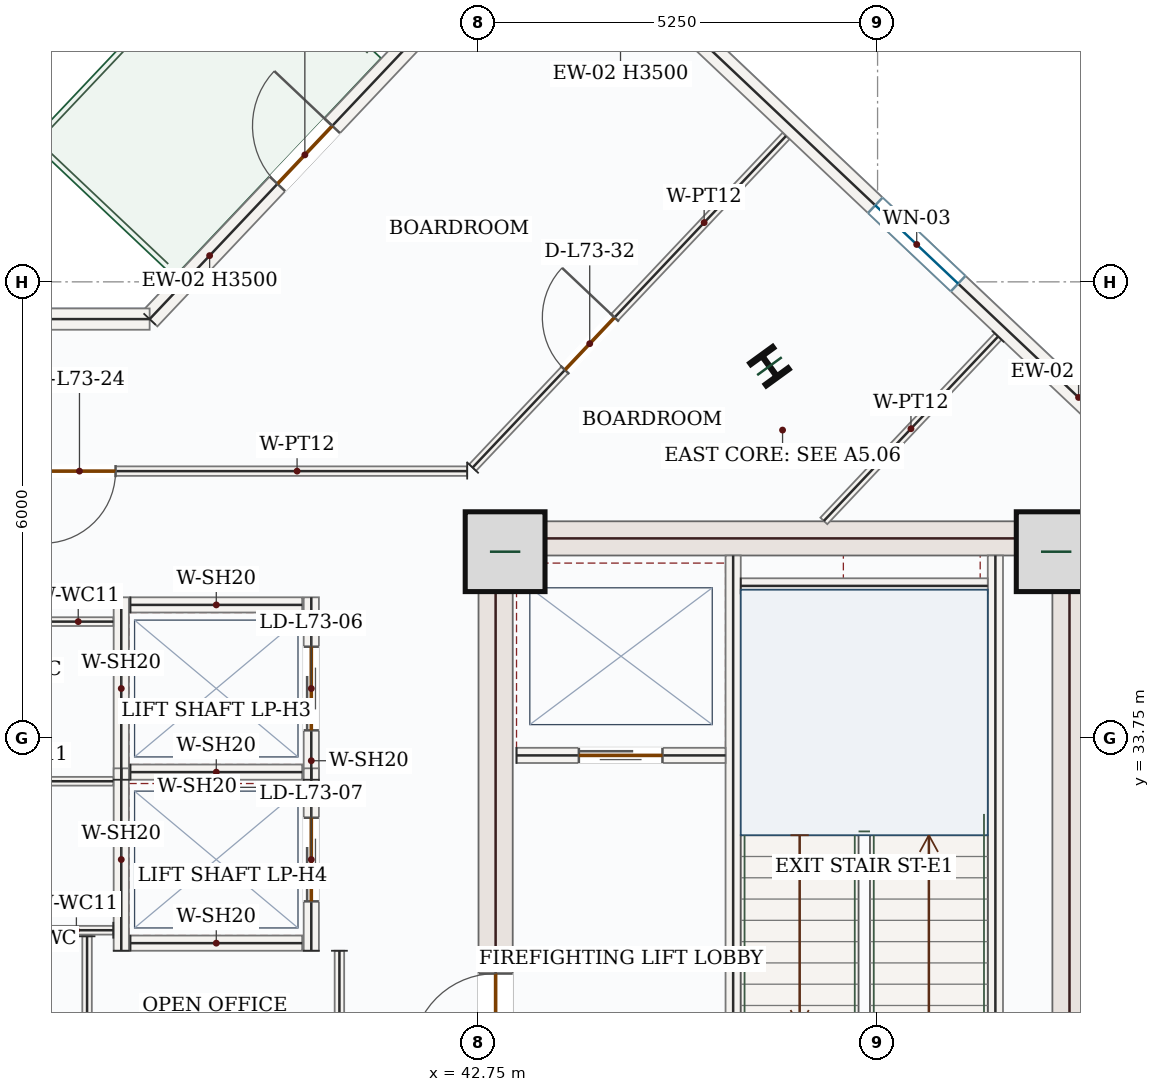
"""IFC4 building model, lengths in metres.
Left out: names, types, materials, properties, quantities, classifications, styles, units other than length and angle.
Written with IfcOpenShell. Run it as: python <this file> out.ifc"""

import sys

from ifc_helpers import new_model, si_unit, direction, frame, frame_2d, origin, origin_2d, place, context, subcontext, project, spatial, rectangle, i_section, extrude, source, transform, mapped, element, fill, save


model = new_model("IFC4")
c1 = context("Model", 3, precision=1e-05, world=origin(), true_north=direction((0.0, 1.0)))
c2 = subcontext(c1, "Body", "Model", "MODEL_VIEW")
j1 = project(units=[si_unit("LENGTHUNIT", "METRE"), si_unit("PLANEANGLEUNIT", "RADIAN")], contexts=[c1])
p1 = place(None, origin())
s1 = spatial("IfcSite", under=j1, at=p1, CompositionType="ELEMENT")
p2 = place(p1, origin())
s2 = spatial("IfcBuilding", under=s1, at=p2, CompositionType="ELEMENT")
p3 = place(p2, frame((0.0, 0.0, 302.85)))
s3 = spatial("IfcBuildingStorey", under=s2, at=p3, CompositionType="ELEMENT", Elevation=302.85)
p4 = place(p3, frame((42.975, 28.05, 0.0), z_axis=(0.0, 0.0, 1.0), x_axis=(0.0, 1.0, 0.0)))
e1 = element("IfcWall", 1, at=p4, inside=s3, PredefinedType="SHEAR", context=c2, shape_type="SweptSolid", body=[
    extrude(rectangle(XDim=8.55, YDim=0.45, at=frame_2d((4.275, 0.0))), origin(), (0.0, 0.0, 1.0), 3.5),
])
p5 = place(p4, frame((1.5, 0.0, 0.0)))
e2 = element("IfcOpeningElement", 2, at=p5, cuts=e1, PredefinedType="OPENING", context=c2, shape_type="SweptSolid", body=[
    extrude(rectangle(XDim=1.1, YDim=2.2, at=frame_2d((0.55, 1.1))), frame((0.0, 0.235, 0.0), z_axis=(0.0, -1.0, 0.0), x_axis=(1.0, 0.0, 0.0)), (0.0, 0.0, 1.0), 0.47),
])
m1 = source(origin(), c2, "Body", "SweptSolid", [
    extrude(rectangle(XDim=8.55, YDim=0.45, at=frame_2d((4.275, 0.0))), origin(), (0.0, 0.0, 1.0), 3.5),
])
p6 = place(p3, frame((50.525, 28.05, 0.0), z_axis=(0.0, 0.0, 1.0), x_axis=(0.0, 1.0, 0.0)))
e3 = element("IfcWall", 3, at=p6, inside=s3, PredefinedType="SHEAR", context=c2, shape_type="MappedRepresentation", body=[
    mapped(m1, transform((0.0, 0.0, 0.0), x_axis=(1.0, 0.0, 0.0), y_axis=(0.0, 1.0, 0.0), z_axis=(0.0, 0.0, 1.0), scale=1.0)),
])
m2 = source(origin(), c2, "Body", "SweptSolid", [
    extrude(rectangle(XDim=7.1, YDim=0.45, at=frame_2d((3.55, 0.0))), origin(), (0.0, 0.0, 1.0), 3.5),
])
p7 = place(p3, frame((43.2, 36.375, 0.0), z_axis=(0.0, 0.0, 1.0), x_axis=(1.0, 0.0, 0.0)))
e4 = element("IfcWall", 4, at=p7, inside=s3, PredefinedType="SHEAR", context=c2, shape_type="MappedRepresentation", body=[
    mapped(m2, transform((0.0, 0.0, 0.0), x_axis=(1.0, 0.0, 0.0), y_axis=(0.0, 1.0, 0.0), z_axis=(0.0, 0.0, 1.0), scale=1.0)),
])
m3 = source(origin(), c2, "Body", "SweptSolid", [
    extrude(rectangle(XDim=1.05, YDim=1.05, at=origin_2d()), origin(), (0.0, 0.0, 1.0), 3.75),
])
for number, where, z_axis, x_axis in (
    (5, (43.1, 36.2, 0.0), (0.0, 0.0, 1.0), (1.0, 0.0, 0.0)),
    (6, (50.35, 36.2, 0.0), (0.0, 0.0, 1.0), (1.0, 0.0, 0.0)),
):
    element("IfcColumn", number, at=place(p3, frame(where, z_axis=z_axis, x_axis=x_axis)), inside=s3, PredefinedType="COLUMN", context=c2, shape_type="MappedRepresentation", body=[
        mapped(m3, transform((0.0, 0.0, 0.0), x_axis=(1.0, 0.0, 0.0), y_axis=(0.0, 1.0, 0.0), z_axis=(0.0, 0.0, 1.0), scale=1.0)),
    ])
m4 = source(origin(), c2, "Body", "SweptSolid", [
    extrude(i_section(OverallWidth=0.374, OverallDepth=0.372, WebThickness=0.016, FlangeThickness=0.026, FilletRadius=0.018, at=origin_2d()), origin(), (0.0, 0.0, 1.0), 3.75),
])
p8 = place(p3, frame((46.578, 38.641, 0.0), z_axis=(0.0, 0.0, 1.0), x_axis=(0.809016994375, 0.587785252292, 0.0)))
e7 = element("IfcColumn", 7, at=p8, inside=s3, PredefinedType="COLUMN", context=c2, shape_type="MappedRepresentation", body=[
    mapped(m4, transform((0.0, 0.0, 0.0), x_axis=(1.0, 0.0, 0.0), y_axis=(0.0, 1.0, 0.0), z_axis=(0.0, 0.0, 1.0), scale=1.0)),
])
p9 = place(p3, frame((38.423, 39.26, 0.0), z_axis=(0.0, 0.0, 1.0), x_axis=(0.686888766374, 0.72676256276, 0.0)))
e8 = element("IfcWall", 8, at=p9, inside=s3, PredefinedType="SOLIDWALL", context=c2, shape_type="SweptSolid", body=[
    extrude(rectangle(XDim=5.945, YDim=0.28, at=frame_2d((2.973, 0.0))), origin(), (0.0, 0.0, 1.0), 3.5),
])
p10 = place(p9, frame((2.448, 0.0, 0.0)))
e9 = element("IfcOpeningElement", 9, at=p10, cuts=e8, PredefinedType="OPENING", context=c2, shape_type="SweptSolid", body=[
    extrude(rectangle(XDim=1.05, YDim=2.15, at=frame_2d((0.525, 1.075))), frame((0.0, 0.15, 0.0), z_axis=(0.0, -1.0, 0.0), x_axis=(1.0, 0.0, 0.0)), (0.0, 0.0, 1.0), 0.3),
])
p11 = place(p3, frame((44.91, 43.649, 0.0), z_axis=(0.0, 0.0, 1.0), x_axis=(0.726772856404, -0.686877875022, 0.0)))
e10 = element("IfcWall", 10, at=p11, inside=s3, PredefinedType="SOLIDWALL", context=c2, shape_type="SweptSolid", body=[
    extrude(rectangle(XDim=9.92, YDim=0.28, at=frame_2d((4.96, 0.0))), origin(), (0.0, 0.0, 1.0), 3.5),
])
p12 = place(p11, frame((4.21, 0.0, 0.85)))
e11 = element("IfcOpeningElement", 11, at=p12, cuts=e10, PredefinedType="OPENING", context=c2, shape_type="SweptSolid", body=[
    extrude(rectangle(XDim=1.5, YDim=1.5, at=frame_2d((0.75, 0.75))), frame((0.0, 0.15, 0.0), z_axis=(0.0, -1.0, 0.0), x_axis=(1.0, 0.0, 0.0)), (0.0, 0.0, 1.0), 0.3),
])
m5 = source(origin(), c2, "Body", "SweptSolid", [
    extrude(rectangle(XDim=5.699, YDim=0.28, at=frame_2d((2.85, 0.0))), origin(), (0.0, 0.0, 1.0), 3.5),
])
p13 = place(p3, frame((32.724, 39.26, 0.0), z_axis=(0.0, 0.0, 1.0), x_axis=(1.0, 0.0, 0.0)))
e12 = element("IfcWall", 12, at=p13, inside=s3, PredefinedType="SOLIDWALL", context=c2, shape_type="MappedRepresentation", body=[
    mapped(m5, transform((0.0, 0.0, 0.0), x_axis=(1.0, 0.0, 0.0), y_axis=(0.0, 1.0, 0.0), z_axis=(0.0, 0.0, 1.0), scale=1.0)),
])
m6 = source(origin(), c2, "Body", "SweptSolid", [
    extrude(rectangle(XDim=7.87, YDim=0.2, at=frame_2d((3.935, 0.0))), origin(), (0.0, 0.0, 1.0), 3.5),
])
p14 = place(p3, frame((49.55, 28.28, 0.0), z_axis=(0.0, 0.0, 1.0), x_axis=(0.0, 1.0, 0.0)))
e13 = element("IfcWall", 13, at=p14, inside=s3, PredefinedType="SOLIDWALL", context=c2, shape_type="MappedRepresentation", body=[
    mapped(m6, transform((0.0, 0.0, 0.0), x_axis=(1.0, 0.0, 0.0), y_axis=(0.0, 1.0, 0.0), z_axis=(0.0, 0.0, 1.0), scale=1.0)),
])
p15 = place(p3, frame((46.1, 28.15, 0.0), z_axis=(0.0, 0.0, 1.0), x_axis=(0.0, 1.0, 0.0)))
e14 = element("IfcWall", 14, at=p15, inside=s3, PredefinedType="SOLIDWALL", context=c2, shape_type="SweptSolid", body=[
    extrude(rectangle(XDim=8.0, YDim=0.2, at=frame_2d((4.0, 0.0))), origin(), (0.0, 0.0, 1.0), 3.5),
])
p16 = place(p15, frame((0.4, 0.0, 0.0)))
e15 = element("IfcOpeningElement", 15, at=p16, cuts=e14, PredefinedType="OPENING", context=c2, shape_type="SweptSolid", body=[
    extrude(rectangle(XDim=1.05, YDim=2.15, at=frame_2d((0.525, 1.075))), frame((0.0, 0.11, 0.0), z_axis=(0.0, -1.0, 0.0), x_axis=(1.0, 0.0, 0.0)), (0.0, 0.0, 1.0), 0.22),
])
m7 = source(origin(), c2, "Body", "SweptSolid", [
    extrude(rectangle(XDim=3.25, YDim=0.2, at=frame_2d((1.625, 0.0))), origin(), (0.0, 0.0, 1.0), 3.5),
])
p17 = place(p3, frame((46.2, 35.75, 0.0), z_axis=(0.0, 0.0, 1.0), x_axis=(1.0, 0.0, 0.0)))
e16 = element("IfcWall", 16, at=p17, inside=s3, PredefinedType="SOLIDWALL", context=c2, shape_type="MappedRepresentation", body=[
    mapped(m7, transform((0.0, 0.0, 0.0), x_axis=(1.0, 0.0, 0.0), y_axis=(0.0, 1.0, 0.0), z_axis=(0.0, 0.0, 1.0), scale=1.0)),
])
p18 = place(p3, frame((43.25, 33.52, 0.0), z_axis=(0.0, 0.0, 1.0), x_axis=(1.0, 0.0, 0.0)))
e17 = element("IfcWall", 17, at=p18, inside=s3, PredefinedType="SOLIDWALL", context=c2, shape_type="SweptSolid", body=[
    extrude(rectangle(XDim=2.75, YDim=0.2, at=frame_2d((1.375, 0.0))), origin(), (0.0, 0.0, 1.0), 3.5),
])
p19 = place(p18, frame((0.82, 0.0, 0.0)))
e18 = element("IfcOpeningElement", 18, at=p19, cuts=e17, PredefinedType="OPENING", context=c2, shape_type="SweptSolid", body=[
    extrude(rectangle(XDim=1.1, YDim=2.15, at=frame_2d((0.55, 1.075))), frame((0.0, 0.11, 0.0), z_axis=(0.0, -1.0, 0.0), x_axis=(1.0, 0.0, 0.0)), (0.0, 0.0, 1.0), 0.22),
])
m8 = source(origin(), c2, "Body", "SweptSolid", [
    extrude(rectangle(XDim=2.4, YDim=0.2, at=frame_2d((1.2, 0.0))), origin(), (0.0, 0.0, 1.0), 3.5),
])
p20 = place(p3, frame((38.05, 33.2, 0.0), z_axis=(0.0, 0.0, 1.0), x_axis=(0.0, 1.0, 0.0)))
e19 = element("IfcWall", 19, at=p20, inside=s3, PredefinedType="SOLIDWALL", context=c2, shape_type="MappedRepresentation", body=[
    mapped(m8, transform((0.0, 0.0, 0.0), x_axis=(1.0, 0.0, 0.0), y_axis=(0.0, 1.0, 0.0), z_axis=(0.0, 0.0, 1.0), scale=1.0)),
])
p21 = place(p3, frame((40.55, 33.2, 0.0), z_axis=(0.0, 0.0, 1.0), x_axis=(0.0, 1.0, 0.0)))
e20 = element("IfcWall", 20, at=p21, inside=s3, PredefinedType="SOLIDWALL", context=c2, shape_type="SweptSolid", body=[
    extrude(rectangle(XDim=2.4, YDim=0.2, at=frame_2d((1.2, 0.0))), origin(), (0.0, 0.0, 1.0), 3.5),
])
p22 = place(p21, frame((0.65, 0.0, 0.0)))
e21 = element("IfcOpeningElement", 21, at=p22, cuts=e20, PredefinedType="OPENING", context=c2, shape_type="SweptSolid", body=[
    extrude(rectangle(XDim=1.1, YDim=2.15, at=frame_2d((0.55, 1.075))), frame((0.0, 0.11, 0.0), z_axis=(0.0, -1.0, 0.0), x_axis=(1.0, 0.0, 0.0)), (0.0, 0.0, 1.0), 0.22),
])
m9 = source(origin(), c2, "Body", "SweptSolid", [
    extrude(rectangle(XDim=2.26, YDim=0.2, at=frame_2d((1.13, 0.0))), origin(), (0.0, 0.0, 1.0), 3.5),
])
for number, where, z_axis, x_axis in (
    (22, (38.17, 33.3, 0.0), (0.0, 0.0, 1.0), (1.0, 0.0, 0.0)),
    (23, (38.17, 35.5, 0.0), (0.0, 0.0, 1.0), (1.0, 0.0, 0.0)),
):
    element("IfcWall", number, at=place(p3, frame(where, z_axis=z_axis, x_axis=x_axis)), inside=s3, PredefinedType="SOLIDWALL", context=c2, shape_type="MappedRepresentation", body=[
        mapped(m9, transform((0.0, 0.0, 0.0), x_axis=(1.0, 0.0, 0.0), y_axis=(0.0, 1.0, 0.0), z_axis=(0.0, 0.0, 1.0), scale=1.0)),
    ])
p23 = place(p3, frame((38.05, 30.95, 0.0), z_axis=(0.0, 0.0, 1.0), x_axis=(0.0, 1.0, 0.0)))
e24 = element("IfcWall", 24, at=p23, inside=s3, PredefinedType="SOLIDWALL", context=c2, shape_type="MappedRepresentation", body=[
    mapped(m8, transform((0.0, 0.0, 0.0), x_axis=(1.0, 0.0, 0.0), y_axis=(0.0, 1.0, 0.0), z_axis=(0.0, 0.0, 1.0), scale=1.0)),
])
p24 = place(p3, frame((40.55, 30.95, 0.0), z_axis=(0.0, 0.0, 1.0), x_axis=(0.0, 1.0, 0.0)))
e25 = element("IfcWall", 25, at=p24, inside=s3, PredefinedType="SOLIDWALL", context=c2, shape_type="SweptSolid", body=[
    extrude(rectangle(XDim=2.4, YDim=0.2, at=frame_2d((1.2, 0.0))), origin(), (0.0, 0.0, 1.0), 3.5),
])
p25 = place(p24, frame((0.65, 0.0, 0.0)))
e26 = element("IfcOpeningElement", 26, at=p25, cuts=e25, PredefinedType="OPENING", context=c2, shape_type="SweptSolid", body=[
    extrude(rectangle(XDim=1.1, YDim=2.15, at=frame_2d((0.55, 1.075))), frame((0.0, 0.11, 0.0), z_axis=(0.0, -1.0, 0.0), x_axis=(1.0, 0.0, 0.0)), (0.0, 0.0, 1.0), 0.22),
])
p26 = place(p3, frame((38.17, 31.05, 0.0), z_axis=(0.0, 0.0, 1.0), x_axis=(1.0, 0.0, 0.0)))
e27 = element("IfcWall", 27, at=p26, inside=s3, PredefinedType="SOLIDWALL", context=c2, shape_type="MappedRepresentation", body=[
    mapped(m9, transform((0.0, 0.0, 0.0), x_axis=(1.0, 0.0, 0.0), y_axis=(0.0, 1.0, 0.0), z_axis=(0.0, 0.0, 1.0), scale=1.0)),
])
p27 = place(p3, frame((37.945, 31.22, 0.0), z_axis=(0.0, 0.0, 1.0), x_axis=(-1.0, 0.0, 0.0)))
e28 = element("IfcWall", 28, at=p27, inside=s3, PredefinedType="PARTITIONING", context=c2, shape_type="SweptSolid", body=[
    extrude(rectangle(XDim=2.355, YDim=0.115, at=frame_2d((1.177, 0.0))), origin(), (0.0, 0.0, 1.0), 3.5),
])
p28 = place(p27, frame((1.121, 0.0, 0.0)))
e29 = element("IfcOpeningElement", 29, at=p28, cuts=e28, PredefinedType="OPENING", context=c2, shape_type="SweptSolid", body=[
    extrude(rectangle(XDim=0.9, YDim=2.1, at=frame_2d((0.45, 1.05))), frame((0.0, 0.067, 0.0), z_axis=(0.0, -1.0, 0.0), x_axis=(1.0, 0.0, 0.0)), (0.0, 0.0, 1.0), 0.135),
])
m10 = source(origin(), c2, "Body", "SweptSolid", [
    extrude(rectangle(XDim=2.292, YDim=0.115, at=frame_2d((1.146, 0.0))), origin(), (0.0, 0.0, 1.0), 3.5),
])
p29 = place(p3, frame((35.653, 33.18, 0.0), z_axis=(0.0, 0.0, 1.0), x_axis=(1.0, 0.0, 0.0)))
e30 = element("IfcWall", 30, at=p29, inside=s3, PredefinedType="PARTITIONING", context=c2, shape_type="MappedRepresentation", body=[
    mapped(m10, transform((0.0, 0.0, 0.0), x_axis=(1.0, 0.0, 0.0), y_axis=(0.0, 1.0, 0.0), z_axis=(0.0, 0.0, 1.0), scale=1.0)),
])
p30 = place(p3, frame((35.653, 35.28, 0.0), z_axis=(0.0, 0.0, 1.0), x_axis=(1.0, 0.0, 0.0)))
e31 = element("IfcWall", 31, at=p30, inside=s3, PredefinedType="PARTITIONING", context=c2, shape_type="SweptSolid", body=[
    extrude(rectangle(XDim=2.292, YDim=0.115, at=frame_2d((1.146, 0.0))), origin(), (0.0, 0.0, 1.0), 3.5),
])
p31 = place(p30, frame((0.32, 0.0, 0.0)))
e32 = element("IfcOpeningElement", 32, at=p31, cuts=e31, PredefinedType="OPENING", context=c2, shape_type="SweptSolid", body=[
    extrude(rectangle(XDim=0.9, YDim=2.1, at=frame_2d((0.45, 1.05))), frame((0.0, 0.067, 0.0), z_axis=(0.0, -1.0, 0.0), x_axis=(1.0, 0.0, 0.0)), (0.0, 0.0, 1.0), 0.135),
])
m11 = source(origin(), c2, "Body", "SweptSolid", [
    extrude(rectangle(XDim=3.2, YDim=0.125, at=frame_2d((1.6, 0.0))), origin(), (0.0, 0.0, 1.0), 3.5),
])
p32 = place(p3, frame((37.6, 31.14, 0.0), z_axis=(0.0, 0.0, 1.0), x_axis=(0.0, -1.0, 0.0)))
e33 = element("IfcWall", 33, at=p32, inside=s3, PredefinedType="PARTITIONING", context=c2, shape_type="MappedRepresentation", body=[
    mapped(m11, transform((0.0, 0.0, 0.0), x_axis=(1.0, 0.0, 0.0), y_axis=(0.0, 1.0, 0.0), z_axis=(0.0, 0.0, 1.0), scale=1.0)),
])
m12 = source(origin(), c2, "Body", "SweptSolid", [
    extrude(rectangle(XDim=3.01, YDim=0.125, at=frame_2d((1.505, 0.0))), origin(), (0.0, 0.0, 1.0), 3.5),
])
p33 = place(p3, frame((40.92, 30.95, 0.0), z_axis=(0.0, 0.0, 1.0), x_axis=(0.0, -1.0, 0.0)))
e34 = element("IfcWall", 34, at=p33, inside=s3, PredefinedType="PARTITIONING", context=c2, shape_type="MappedRepresentation", body=[
    mapped(m12, transform((0.0, 0.0, 0.0), x_axis=(1.0, 0.0, 0.0), y_axis=(0.0, 1.0, 0.0), z_axis=(0.0, 0.0, 1.0), scale=1.0)),
])
m13 = source(origin(), c2, "Body", "SweptSolid", [
    extrude(rectangle(XDim=3.337, YDim=0.125, at=frame_2d((1.669, 0.0))), origin(), (0.0, 0.0, 1.0), 3.5),
])
p34 = place(p3, frame((49.585, 39.031, 0.0), z_axis=(0.0, 0.0, 1.0), x_axis=(-0.686891986515, -0.726759519278, 0.0)))
e35 = element("IfcWall", 35, at=p34, inside=s3, PredefinedType="PARTITIONING", context=c2, shape_type="MappedRepresentation", body=[
    mapped(m13, transform((0.0, 0.0, 0.0), x_axis=(1.0, 0.0, 0.0), y_axis=(0.0, 1.0, 0.0), z_axis=(0.0, 0.0, 1.0), scale=1.0)),
])
p35 = place(p3, frame((42.672, 37.306, 0.0), z_axis=(0.0, 0.0, 1.0), x_axis=(0.686871949206, 0.726778456886, 0.0)))
e36 = element("IfcWall", 36, at=p35, inside=s3, PredefinedType="PARTITIONING", context=c2, shape_type="SweptSolid", body=[
    extrude(rectangle(XDim=6.001, YDim=0.125, at=frame_2d((3.001, 0.0))), origin(), (0.0, 0.0, 1.0), 3.5),
])
p36 = place(p35, frame((1.768, 0.0, 0.0)))
e37 = element("IfcOpeningElement", 37, at=p36, cuts=e36, PredefinedType="OPENING", context=c2, shape_type="SweptSolid", body=[
    extrude(rectangle(XDim=0.95, YDim=2.15, at=frame_2d((0.475, 1.075))), frame((0.0, 0.073, 0.0), z_axis=(0.0, -1.0, 0.0), x_axis=(1.0, 0.0, 0.0)), (0.0, 0.0, 1.0), 0.145),
])
p37 = place(p3, frame((42.601, 37.26, 0.0), z_axis=(0.0, 0.0, 1.0), x_axis=(-1.0, 0.0, 0.0)))
e38 = element("IfcWall", 38, at=p37, inside=s3, PredefinedType="PARTITIONING", context=c2, shape_type="SweptSolid", body=[
    extrude(rectangle(XDim=6.881, YDim=0.125, at=frame_2d((3.44, 0.0))), origin(), (0.0, 0.0, 1.0), 3.5),
])
p38 = place(p37, frame((4.626, 0.0, 0.0)))
e39 = element("IfcOpeningElement", 39, at=p38, cuts=e38, PredefinedType="OPENING", context=c2, shape_type="SweptSolid", body=[
    extrude(rectangle(XDim=0.95, YDim=2.15, at=frame_2d((0.475, 1.075))), frame((0.0, 0.073, 0.0), z_axis=(0.0, -1.0, 0.0), x_axis=(1.0, 0.0, 0.0)), (0.0, 0.0, 1.0), 0.145),
])
m14 = source(origin(), c2, "Body", "SweptSolid", [
    extrude(rectangle(XDim=1.05, YDim=2.15, at=frame_2d((0.525, 1.075))), frame((0.0, 0.025, 0.0), z_axis=(0.0, -1.0, 0.0), x_axis=(1.0, 0.0, 0.0)), (0.0, 0.0, 1.0), 0.05),
])
p39 = place(p10, origin())
e40 = element("IfcDoor", 40, at=p39, inside=s3, OperationType="SINGLE_SWING_RIGHT", PredefinedType="DOOR", context=c2, shape_type="MappedRepresentation", body=[
    mapped(m14, transform((0.0, 0.0, 0.0), x_axis=(1.0, 0.0, 0.0), y_axis=(0.0, 1.0, 0.0), z_axis=(0.0, 0.0, 1.0), scale=1.0)),
])
fill(e9, e40)
m15 = source(origin(), c2, "Body", "SweptSolid", [
    extrude(rectangle(XDim=1.5, YDim=1.5, at=frame_2d((0.75, 0.75))), frame((0.0, 0.03, 0.0), z_axis=(0.0, -1.0, 0.0), x_axis=(1.0, 0.0, 0.0)), (0.0, 0.0, 1.0), 0.06),
])
p40 = place(p12, origin())
e41 = element("IfcWindow", 41, at=p40, inside=s3, PartitioningType="SINGLE_PANEL", PredefinedType="WINDOW", context=c2, shape_type="MappedRepresentation", body=[
    mapped(m15, transform((0.0, 0.0, 0.0), x_axis=(1.0, 0.0, 0.0), y_axis=(0.0, 1.0, 0.0), z_axis=(0.0, 0.0, 1.0), scale=1.0)),
])
fill(e11, e41)
m16 = source(origin(), c2, "Body", "SweptSolid", [
    extrude(rectangle(XDim=1.1, YDim=2.15, at=frame_2d((0.55, 1.075))), frame((0.0, 0.025, 0.0), z_axis=(0.0, -1.0, 0.0), x_axis=(1.0, 0.0, 0.0)), (0.0, 0.0, 1.0), 0.05),
])
p41 = place(p19, origin())
e42 = element("IfcDoor", 42, at=p41, inside=s3, OperationType="DOUBLE_DOOR_SLIDING", PredefinedType="DOOR", context=c2, shape_type="MappedRepresentation", body=[
    mapped(m16, transform((0.0, 0.0, 0.0), x_axis=(1.0, 0.0, 0.0), y_axis=(0.0, 1.0, 0.0), z_axis=(0.0, 0.0, 1.0), scale=1.0)),
])
fill(e18, e42)
m17 = source(origin(), c2, "Body", "SweptSolid", [
    extrude(rectangle(XDim=1.1, YDim=2.2, at=frame_2d((0.55, 1.1))), frame((0.0, 0.025, 0.0), z_axis=(0.0, -1.0, 0.0), x_axis=(1.0, 0.0, 0.0)), (0.0, 0.0, 1.0), 0.05),
])
p42 = place(p5, origin())
e43 = element("IfcDoor", 43, at=p42, inside=s3, OperationType="SINGLE_SWING_LEFT", PredefinedType="DOOR", context=c2, shape_type="MappedRepresentation", body=[
    mapped(m17, transform((0.0, 0.0, 0.0), x_axis=(1.0, 0.0, 0.0), y_axis=(0.0, 1.0, 0.0), z_axis=(0.0, 0.0, 1.0), scale=1.0)),
])
fill(e2, e43)
p43 = place(p22, origin())
e44 = element("IfcDoor", 44, at=p43, inside=s3, OperationType="DOUBLE_DOOR_SLIDING", PredefinedType="DOOR", context=c2, shape_type="MappedRepresentation", body=[
    mapped(m16, transform((0.0, 0.0, 0.0), x_axis=(1.0, 0.0, 0.0), y_axis=(0.0, 1.0, 0.0), z_axis=(0.0, 0.0, 1.0), scale=1.0)),
])
fill(e21, e44)
p44 = place(p25, origin())
e45 = element("IfcDoor", 45, at=p44, inside=s3, OperationType="DOUBLE_DOOR_SLIDING", PredefinedType="DOOR", context=c2, shape_type="MappedRepresentation", body=[
    mapped(m16, transform((0.0, 0.0, 0.0), x_axis=(1.0, 0.0, 0.0), y_axis=(0.0, 1.0, 0.0), z_axis=(0.0, 0.0, 1.0), scale=1.0)),
])
fill(e26, e45)
m18 = source(origin(), c2, "Body", "SweptSolid", [
    extrude(rectangle(XDim=0.95, YDim=2.15, at=frame_2d((0.475, 1.075))), frame((0.0, 0.025, 0.0), z_axis=(0.0, -1.0, 0.0), x_axis=(1.0, 0.0, 0.0)), (0.0, 0.0, 1.0), 0.05),
])
p45 = place(p38, origin())
e46 = element("IfcDoor", 46, at=p45, inside=s3, OperationType="SINGLE_SWING_RIGHT", PredefinedType="DOOR", context=c2, shape_type="MappedRepresentation", body=[
    mapped(m18, transform((0.0, 0.0, 0.0), x_axis=(1.0, 0.0, 0.0), y_axis=(0.0, 1.0, 0.0), z_axis=(0.0, 0.0, 1.0), scale=1.0)),
])
fill(e39, e46)
p46 = place(p36, origin())
e47 = element("IfcDoor", 47, at=p46, inside=s3, OperationType="SINGLE_SWING_RIGHT", PredefinedType="DOOR", context=c2, shape_type="MappedRepresentation", body=[
    mapped(m18, transform((0.0, 0.0, 0.0), x_axis=(1.0, 0.0, 0.0), y_axis=(0.0, 1.0, 0.0), z_axis=(0.0, 0.0, 1.0), scale=1.0)),
])
fill(e37, e47)
save(model, sys.argv[1])
